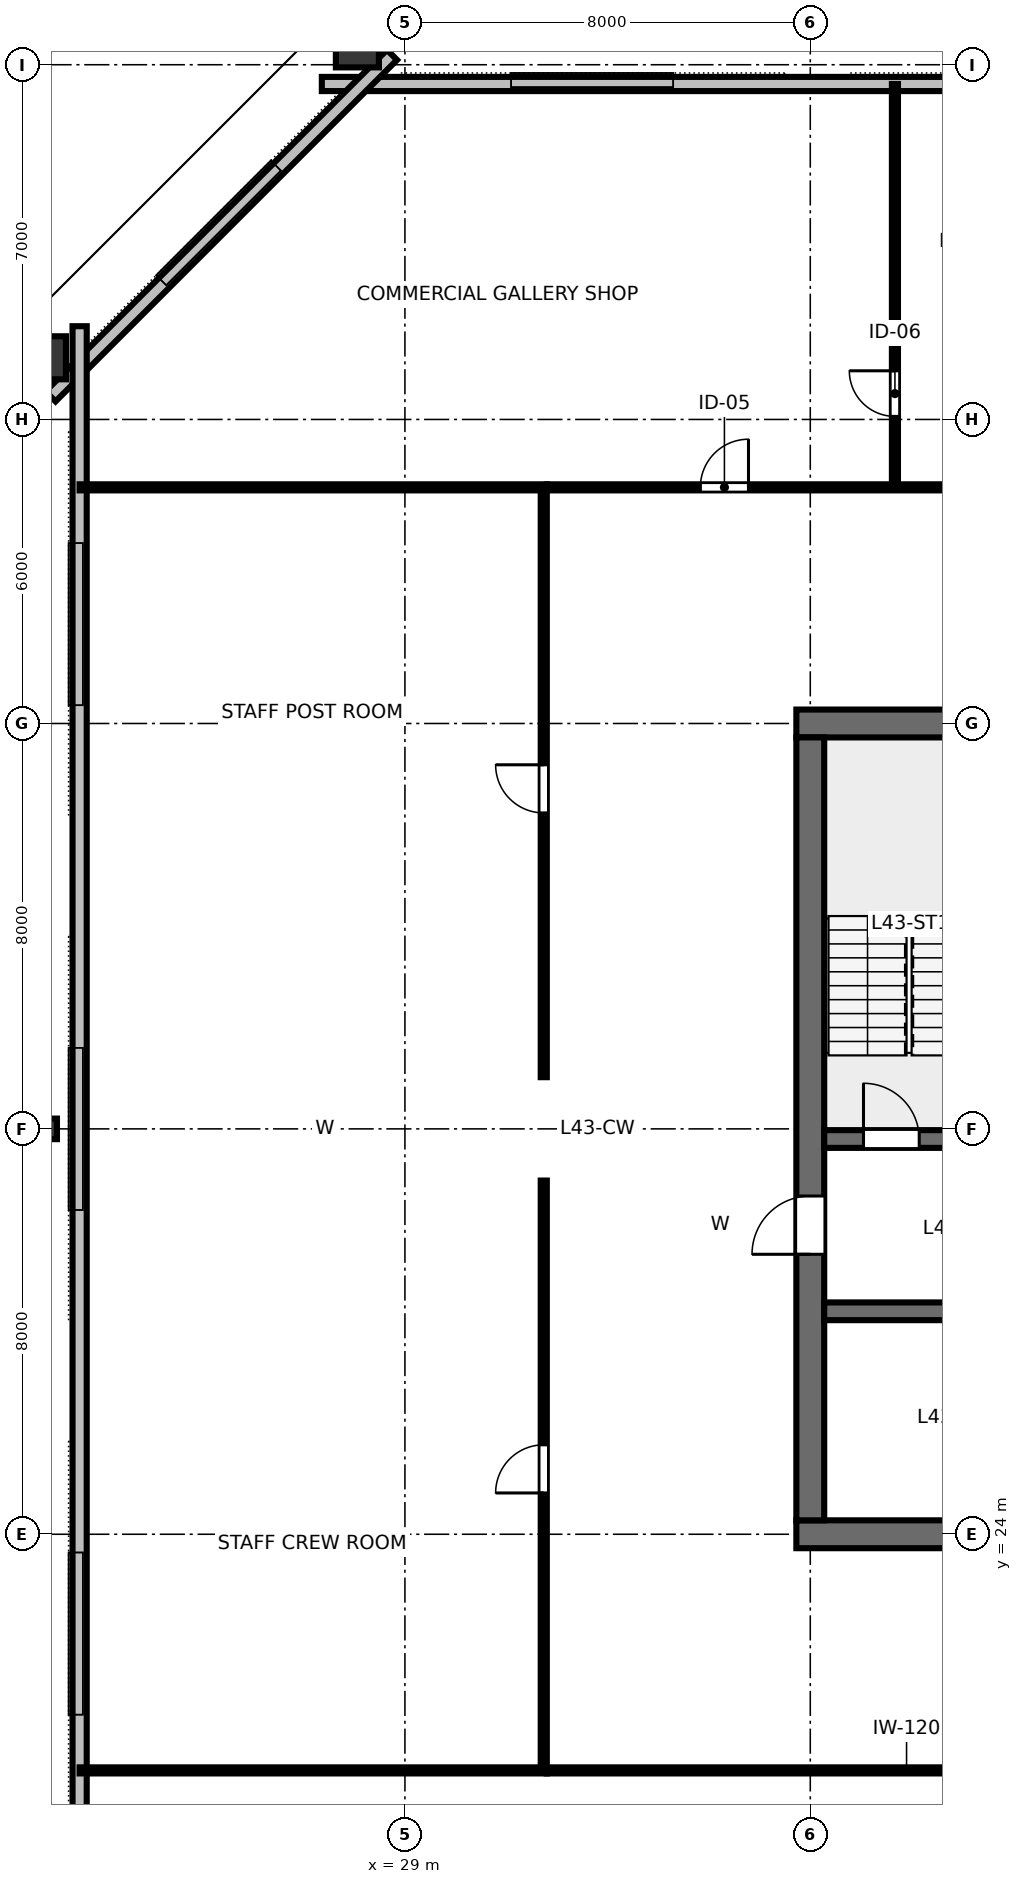
"""IFC4 building model, lengths in metres.
Left out: names, types, materials, properties, quantities, classifications, styles, units other than length and angle.
Written with IfcOpenShell. Run it as: python <this file> out.ifc"""

import sys

from ifc_helpers import new_model, si_unit, direction, frame, frame_2d, origin, origin_2d, place, context, subcontext, project, spatial, rectangle, hollow_rectangle, i_section, extrude, element, fill, save


model = new_model("IFC4")
c1 = context("Model", 3, precision=1e-05, world=origin(), true_north=direction((0.0, 1.0)))
c2 = subcontext(c1, "Body", "Model", "MODEL_VIEW")
j1 = project(units=[si_unit("LENGTHUNIT", "METRE"), si_unit("PLANEANGLEUNIT", "RADIAN")], contexts=[c1])
p1 = place(None, origin())
s1 = spatial("IfcSite", under=j1, at=p1, CompositionType="ELEMENT")
p2 = place(p1, origin())
s2 = spatial("IfcBuilding", under=s1, at=p2, CompositionType="ELEMENT")
p3 = place(p2, frame((0.0, 0.0, 163.6)))
s3 = spatial("IfcBuildingStorey", under=s2, at=p3, CompositionType="ELEMENT", Elevation=163.6)
p4 = place(p3, frame((36.725, 24.0, 0.0), z_axis=(0.0, 0.0, 1.0), x_axis=(1.0, 0.0, 0.0)))
e1 = element("IfcWall", 1, at=p4, inside=s3, PredefinedType="SHEAR", context=c2, shape_type="SweptSolid", body=[
    extrude(rectangle(XDim=18.55, YDim=0.55, at=frame_2d((9.275, 0.0))), origin(), (0.0, 0.0, 1.0), 3.28),
])
p5 = place(p4, frame((8.275, 0.0, 0.0)))
e2 = element("IfcOpeningElement", 2, at=p5, cuts=e1, PredefinedType="OPENING", context=c2, shape_type="SweptSolid", body=[
    extrude(rectangle(XDim=1.6, YDim=2.15, at=frame_2d((0.8, 1.075))), frame((0.0, 0.285, 0.0), z_axis=(0.0, -1.0, 0.0), x_axis=(1.0, 0.0, 0.0)), (0.0, 0.0, 1.0), 0.57),
])
p6 = place(p4, frame((13.675, 0.0, 0.0)))
e3 = element("IfcOpeningElement", 3, at=p6, cuts=e1, PredefinedType="OPENING", context=c2, shape_type="SweptSolid", body=[
    extrude(rectangle(XDim=1.6, YDim=2.15, at=frame_2d((0.8, 1.075))), frame((0.0, 0.285, 0.0), z_axis=(0.0, -1.0, 0.0), x_axis=(1.0, 0.0, 0.0)), (0.0, 0.0, 1.0), 0.57),
])
p7 = place(p3, frame((36.725, 40.0, 0.0), z_axis=(0.0, 0.0, 1.0), x_axis=(1.0, 0.0, 0.0)))
e4 = element("IfcWall", 4, at=p7, inside=s3, PredefinedType="SHEAR", context=c2, shape_type="SweptSolid", body=[
    extrude(rectangle(XDim=18.55, YDim=0.55, at=frame_2d((9.275, 0.0))), origin(), (0.0, 0.0, 1.0), 3.28),
])
p8 = place(p7, frame((8.775, 0.0, 0.0)))
e5 = element("IfcOpeningElement", 5, at=p8, cuts=e4, PredefinedType="OPENING", context=c2, shape_type="SweptSolid", body=[
    extrude(rectangle(XDim=1.0, YDim=2.15, at=frame_2d((0.5, 1.075))), frame((0.0, 0.285, 0.0), z_axis=(0.0, -1.0, 0.0), x_axis=(1.0, 0.0, 0.0)), (0.0, 0.0, 1.0), 0.57),
])
p9 = place(p3, frame((37.0, 24.275, 0.0), z_axis=(0.0, 0.0, 1.0), x_axis=(0.0, 1.0, 0.0)))
e6 = element("IfcWall", 6, at=p9, inside=s3, PredefinedType="SHEAR", context=c2, shape_type="SweptSolid", body=[
    extrude(rectangle(XDim=15.45, YDim=0.55, at=frame_2d((7.725, 0.0))), origin(), (0.0, 0.0, 1.0), 3.28),
])
p10 = place(p9, frame((5.25, 0.0, 0.0)))
e7 = element("IfcOpeningElement", 7, at=p10, cuts=e6, PredefinedType="OPENING", context=c2, shape_type="SweptSolid", body=[
    extrude(rectangle(XDim=1.15, YDim=2.15, at=frame_2d((0.575, 1.075))), frame((0.0, 0.285, 0.0), z_axis=(0.0, -1.0, 0.0), x_axis=(1.0, 0.0, 0.0)), (0.0, 0.0, 1.0), 0.57),
])
p11 = place(p3, frame((37.275, 31.8, 0.0), z_axis=(0.0, 0.0, 1.0), x_axis=(1.0, 0.0, 0.0)))
e8 = element("IfcWall", 8, at=p11, inside=s3, PredefinedType="SHEAR", context=c2, shape_type="SweptSolid", body=[
    extrude(rectangle(XDim=17.45, YDim=0.35, at=frame_2d((8.725, 0.0))), origin(), (0.0, 0.0, 1.0), 3.28),
])
p12 = place(p11, frame((0.775, 0.0, 0.0)))
e9 = element("IfcOpeningElement", 9, at=p12, cuts=e8, PredefinedType="OPENING", context=c2, shape_type="SweptSolid", body=[
    extrude(rectangle(XDim=1.1, YDim=2.15, at=frame_2d((0.55, 1.075))), frame((0.0, 0.185, 0.0), z_axis=(0.0, -1.0, 0.0), x_axis=(1.0, 0.0, 0.0)), (0.0, 0.0, 1.0), 0.37),
])
p13 = place(p11, frame((14.675, 0.0, 0.0)))
e10 = element("IfcOpeningElement", 10, at=p13, cuts=e8, PredefinedType="OPENING", context=c2, shape_type="SweptSolid", body=[
    extrude(rectangle(XDim=1.1, YDim=2.15, at=frame_2d((0.55, 1.075))), frame((0.0, 0.185, 0.0), z_axis=(0.0, -1.0, 0.0), x_axis=(1.0, 0.0, 0.0)), (0.0, 0.0, 1.0), 0.37),
])
p14 = place(p3, frame((37.275, 28.4, 0.0), z_axis=(0.0, 0.0, 1.0), x_axis=(1.0, 0.0, 0.0)))
e11 = element("IfcWall", 11, at=p14, inside=s3, PredefinedType="SHEAR", context=c2, shape_type="SweptSolid", body=[
    extrude(rectangle(XDim=17.45, YDim=0.35, at=frame_2d((8.725, 0.0))), origin(), (0.0, 0.0, 1.0), 3.28),
])
p15 = place(p3, frame((28.062, 53.448, 0.0), z_axis=(0.177459869766, -0.131769219711, 0.975266562207), x_axis=(0.596154567715, 0.802869685187, 0.0)))
e12 = element("IfcColumn", 12, at=p15, inside=s3, PredefinedType="COLUMN", context=c2, shape_type="SweptSolid", body=[
    extrude(hollow_rectangle(XDim=0.85, YDim=1.0, WallThickness=0.05, at=origin_2d()), origin(), (0.0, 0.0, 1.0), 3.361),
])
p16 = place(p3, frame((21.81, 47.217, 0.0), z_axis=(0.155392621081, -0.153720951163, 0.975819144354), x_axis=(-0.693729718615, 0.686266770285, 0.218579499296)))
e13 = element("IfcColumn", 13, at=p16, inside=s3, PredefinedType="COLUMN", context=c2, shape_type="SweptSolid", body=[
    extrude(hollow_rectangle(XDim=0.85, YDim=1.0, WallThickness=0.05, at=origin_2d()), origin(), (0.0, 0.0, 1.0), 3.359),
])
p17 = place(p3, frame((21.92, 32.0, 0.0), z_axis=(0.156687816488, 0.0, 0.987648180358), x_axis=(-0.987648180358, 0.0, 0.156687816488)))
e14 = element("IfcColumn", 14, at=p17, inside=s3, PredefinedType="COLUMN", context=c2, shape_type="SweptSolid", body=[
    extrude(i_section(OverallWidth=0.406, OverallDepth=0.425, WebThickness=0.033, FlangeThickness=0.052, FilletRadius=0.025, at=origin_2d()), origin(), (0.0, 0.0, 1.0), 3.319),
])
p18 = place(p3, frame((64.64, 52.62, 0.0), z_axis=(0.0, 0.0, 1.0), x_axis=(-1.0, 0.0, 0.0)))
e15 = element("IfcWall", 15, at=p18, inside=s3, PredefinedType="STANDARD", context=c2, shape_type="SweptSolid", body=[
    extrude(rectangle(XDim=37.28, YDim=0.28, at=frame_2d((18.64, 0.0))), origin(), (0.0, 0.0, 1.0), 2.343),
])
p19 = place(p3, frame((28.746, 53.194, 0.0), z_axis=(0.0, 0.0, 1.0), x_axis=(-0.707119588888, -0.707093973253, 0.0)))
e16 = element("IfcWall", 16, at=p19, inside=s3, PredefinedType="STANDARD", context=c2, shape_type="SweptSolid", body=[
    extrude(rectangle(XDim=9.531, YDim=0.28, at=frame_2d((4.766, 0.0))), origin(), (0.0, 0.0, 1.0), 2.343),
])
p20 = place(p3, frame((22.58, 47.84, 0.0), z_axis=(0.0, 0.0, 1.0), x_axis=(0.0, -1.0, 0.0)))
e17 = element("IfcWall", 17, at=p20, inside=s3, PredefinedType="STANDARD", context=c2, shape_type="SweptSolid", body=[
    extrude(rectangle(XDim=31.68, YDim=0.28, at=frame_2d((15.84, 0.0))), origin(), (0.0, 0.0, 1.0), 2.343),
])
p21 = place(p3, frame((31.8, 19.34, 0.0), z_axis=(0.0, 0.0, 1.0), x_axis=(1.0, 0.0, 0.0)))
e18 = element("IfcWall", 18, at=p21, inside=s3, PredefinedType="PARTITIONING", context=c2, shape_type="SweptSolid", body=[
    extrude(rectangle(XDim=28.4, YDim=0.12, at=frame_2d((14.2, 0.0))), origin(), (0.0, 0.0, 1.0), 2.56),
])
p22 = place(p21, frame((13.725, 0.0, 0.0)))
e19 = element("IfcOpeningElement", 19, at=p22, cuts=e18, PredefinedType="OPENING", context=c2, shape_type="SweptSolid", body=[
    extrude(rectangle(XDim=0.95, YDim=2.15, at=frame_2d((0.475, 1.075))), frame((0.0, 0.07, 0.0), z_axis=(0.0, -1.0, 0.0), x_axis=(1.0, 0.0, 0.0)), (0.0, 0.0, 1.0), 0.14),
])
p23 = place(p3, frame((38.67, 44.66, 0.0), z_axis=(0.0, 0.0, 1.0), x_axis=(0.0, 1.0, 0.0)))
e20 = element("IfcWall", 20, at=p23, inside=s3, PredefinedType="PARTITIONING", context=c2, shape_type="SweptSolid", body=[
    extrude(rectangle(XDim=7.96, YDim=0.12, at=frame_2d((3.98, 0.0))), origin(), (0.0, 0.0, 1.0), 2.56),
])
p24 = place(p23, frame((1.4, 0.0, 0.0)))
e21 = element("IfcOpeningElement", 21, at=p24, cuts=e20, PredefinedType="OPENING", context=c2, shape_type="SweptSolid", body=[
    extrude(rectangle(XDim=0.9, YDim=2.15, at=frame_2d((0.45, 1.075))), frame((0.0, 0.07, 0.0), z_axis=(0.0, -1.0, 0.0), x_axis=(1.0, 0.0, 0.0)), (0.0, 0.0, 1.0), 0.14),
])
p25 = place(p3, frame((31.8, 44.66, 0.0), z_axis=(0.0, 0.0, 1.0), x_axis=(1.0, 0.0, 0.0)))
e22 = element("IfcWall", 22, at=p25, inside=s3, PredefinedType="PARTITIONING", context=c2, shape_type="SweptSolid", body=[
    extrude(rectangle(XDim=28.4, YDim=0.12, at=frame_2d((14.2, 0.0))), origin(), (0.0, 0.0, 1.0), 2.56),
])
p26 = place(p25, frame((3.03, 0.0, 0.0)))
e23 = element("IfcOpeningElement", 23, at=p26, cuts=e22, PredefinedType="OPENING", context=c2, shape_type="SweptSolid", body=[
    extrude(rectangle(XDim=0.95, YDim=2.15, at=frame_2d((0.475, 1.075))), frame((0.0, 0.07, 0.0), z_axis=(0.0, -1.0, 0.0), x_axis=(1.0, 0.0, 0.0)), (0.0, 0.0, 1.0), 0.14),
])
p27 = place(p25, frame((8.077, 0.0, 0.0)))
e24 = element("IfcOpeningElement", 24, at=p27, cuts=e22, PredefinedType="OPENING", context=c2, shape_type="SweptSolid", body=[
    extrude(rectangle(XDim=0.95, YDim=2.15, at=frame_2d((0.475, 1.075))), frame((0.0, 0.07, 0.0), z_axis=(0.0, -1.0, 0.0), x_axis=(1.0, 0.0, 0.0)), (0.0, 0.0, 1.0), 0.14),
])
p28 = place(p25, frame((12.396, 0.0, 0.0)))
e25 = element("IfcOpeningElement", 25, at=p28, cuts=e22, PredefinedType="OPENING", context=c2, shape_type="SweptSolid", body=[
    extrude(rectangle(XDim=0.95, YDim=2.15, at=frame_2d((0.475, 1.075))), frame((0.0, 0.07, 0.0), z_axis=(0.0, -1.0, 0.0), x_axis=(1.0, 0.0, 0.0)), (0.0, 0.0, 1.0), 0.14),
])
p29 = place(p25, frame((16.918, 0.0, 0.0)))
e26 = element("IfcOpeningElement", 26, at=p29, cuts=e22, PredefinedType="OPENING", context=c2, shape_type="SweptSolid", body=[
    extrude(rectangle(XDim=0.95, YDim=2.15, at=frame_2d((0.475, 1.075))), frame((0.0, 0.07, 0.0), z_axis=(0.0, -1.0, 0.0), x_axis=(1.0, 0.0, 0.0)), (0.0, 0.0, 1.0), 0.14),
])
p30 = place(p25, frame((23.295, 0.0, 0.0)))
e27 = element("IfcOpeningElement", 27, at=p30, cuts=e22, PredefinedType="OPENING", context=c2, shape_type="SweptSolid", body=[
    extrude(rectangle(XDim=0.95, YDim=2.15, at=frame_2d((0.475, 1.075))), frame((0.0, 0.07, 0.0), z_axis=(0.0, -1.0, 0.0), x_axis=(1.0, 0.0, 0.0)), (0.0, 0.0, 1.0), 0.14),
])
p31 = place(p3, frame((31.74, 19.4, 0.0), z_axis=(0.0, 0.0, 1.0), x_axis=(0.0, 1.0, 0.0)))
e28 = element("IfcWall", 28, at=p31, inside=s3, PredefinedType="PARTITIONING", context=c2, shape_type="SweptSolid", body=[
    extrude(rectangle(XDim=11.58, YDim=0.12, at=frame_2d((5.79, 0.0))), origin(), (0.0, 0.0, 1.0), 2.56),
])
p32 = place(p31, frame((5.415, 0.0, 0.0)))
e29 = element("IfcOpeningElement", 29, at=p32, cuts=e28, PredefinedType="OPENING", context=c2, shape_type="SweptSolid", body=[
    extrude(rectangle(XDim=0.95, YDim=2.15, at=frame_2d((0.475, 1.075))), frame((0.0, 0.07, 0.0), z_axis=(0.0, -1.0, 0.0), x_axis=(1.0, 0.0, 0.0)), (0.0, 0.0, 1.0), 0.14),
])
p33 = place(p3, frame((31.74, 33.02, 0.0), z_axis=(0.0, 0.0, 1.0), x_axis=(0.0, 1.0, 0.0)))
e30 = element("IfcWall", 30, at=p33, inside=s3, PredefinedType="PARTITIONING", context=c2, shape_type="SweptSolid", body=[
    extrude(rectangle(XDim=11.58, YDim=0.12, at=frame_2d((5.79, 0.0))), origin(), (0.0, 0.0, 1.0), 2.56),
])
p34 = place(p33, frame((5.215, 0.0, 0.0)))
e31 = element("IfcOpeningElement", 31, at=p34, cuts=e30, PredefinedType="OPENING", context=c2, shape_type="SweptSolid", body=[
    extrude(rectangle(XDim=0.95, YDim=2.15, at=frame_2d((0.475, 1.075))), frame((0.0, 0.07, 0.0), z_axis=(0.0, -1.0, 0.0), x_axis=(1.0, 0.0, 0.0)), (0.0, 0.0, 1.0), 0.14),
])
for number, where, z_axis, x_axis in (
    (32, (31.8, 19.34, 0.0), (0.0, 0.0, 1.0), (-1.0, 0.0, 0.0)),
    (33, (31.8, 44.66, 0.0), (0.0, 0.0, 1.0), (-1.0, 0.0, 0.0)),
):
    element("IfcWall", number, at=place(p3, frame(where, z_axis=z_axis, x_axis=x_axis)), inside=s3, PredefinedType="PARTITIONING", context=c2, shape_type="SweptSolid", body=[
        extrude(rectangle(XDim=9.22, YDim=0.12, at=frame_2d((4.61, 0.0))), origin(), (0.0, 0.0, 1.0), 2.56),
    ])
p35 = place(p12, origin())
e34 = element("IfcDoor", 34, at=p35, inside=s3, OperationType="SINGLE_SWING_LEFT", PredefinedType="DOOR", context=c2, shape_type="SweptSolid", body=[
    extrude(rectangle(XDim=1.1, YDim=2.15, at=frame_2d((0.55, 1.075))), frame((0.0, 0.025, 0.0), z_axis=(0.0, -1.0, 0.0), x_axis=(1.0, 0.0, 0.0)), (0.0, 0.0, 1.0), 0.05),
])
fill(e9, e34)
p36 = place(p10, origin())
e35 = element("IfcDoor", 35, at=p36, inside=s3, OperationType="SINGLE_SWING_LEFT", PredefinedType="DOOR", context=c2, shape_type="SweptSolid", body=[
    extrude(rectangle(XDim=1.15, YDim=2.15, at=frame_2d((0.575, 1.075))), frame((0.0, 0.025, 0.0), z_axis=(0.0, -1.0, 0.0), x_axis=(1.0, 0.0, 0.0)), (0.0, 0.0, 1.0), 0.05),
])
fill(e7, e35)
p37 = place(p24, origin())
e36 = element("IfcDoor", 36, at=p37, inside=s3, OperationType="SINGLE_SWING_RIGHT", PredefinedType="DOOR", context=c2, shape_type="SweptSolid", body=[
    extrude(rectangle(XDim=0.9, YDim=2.15, at=frame_2d((0.45, 1.075))), frame((0.0, 0.025, 0.0), z_axis=(0.0, -1.0, 0.0), x_axis=(1.0, 0.0, 0.0)), (0.0, 0.0, 1.0), 0.05),
])
fill(e21, e36)
p38 = place(p26, origin())
e37 = element("IfcDoor", 37, at=p38, inside=s3, OperationType="SINGLE_SWING_RIGHT", PredefinedType="DOOR", context=c2, shape_type="SweptSolid", body=[
    extrude(rectangle(XDim=0.95, YDim=2.15, at=frame_2d((0.475, 1.075))), frame((0.0, 0.025, 0.0), z_axis=(0.0, -1.0, 0.0), x_axis=(1.0, 0.0, 0.0)), (0.0, 0.0, 1.0), 0.05),
])
fill(e23, e37)
p39 = place(p32, origin())
e38 = element("IfcDoor", 38, at=p39, inside=s3, OperationType="SINGLE_SWING_LEFT", PredefinedType="DOOR", context=c2, shape_type="SweptSolid", body=[
    extrude(rectangle(XDim=0.95, YDim=2.15, at=frame_2d((0.475, 1.075))), frame((0.0, 0.025, 0.0), z_axis=(0.0, -1.0, 0.0), x_axis=(1.0, 0.0, 0.0)), (0.0, 0.0, 1.0), 0.05),
])
fill(e29, e38)
p40 = place(p34, origin())
e39 = element("IfcDoor", 39, at=p40, inside=s3, OperationType="SINGLE_SWING_RIGHT", PredefinedType="DOOR", context=c2, shape_type="SweptSolid", body=[
    extrude(rectangle(XDim=0.95, YDim=2.15, at=frame_2d((0.475, 1.075))), frame((0.0, 0.025, 0.0), z_axis=(0.0, -1.0, 0.0), x_axis=(1.0, 0.0, 0.0)), (0.0, 0.0, 1.0), 0.05),
])
fill(e31, e39)
save(model, sys.argv[1])
